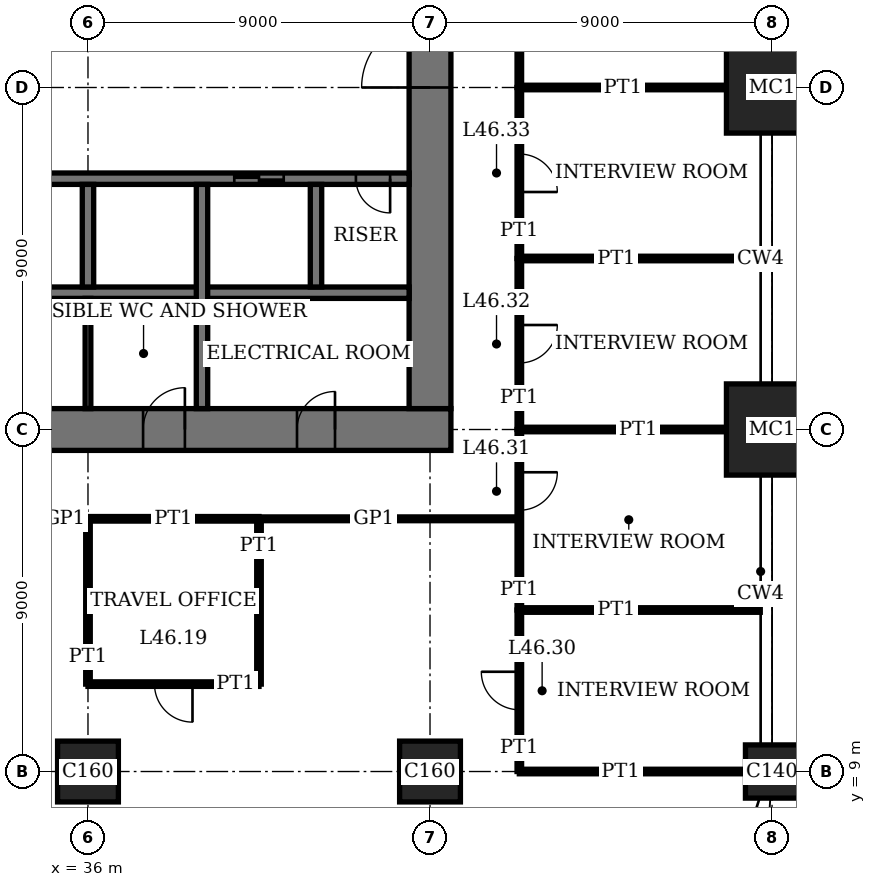
"""IFC4 building model, lengths in metres.
Left out: names, types, materials, properties, quantities, classifications, styles, units other than length and angle.
Written with IfcOpenShell. Run it as: python <this file> out.ifc"""

import sys

from ifc_helpers import new_model, si_unit, direction, frame, frame_2d, origin, origin_2d, place, context, subcontext, project, spatial, rectangle, extrude, element, fill, save


model = new_model("IFC4")
c1 = context("Model", 3, precision=1e-05, world=origin(), true_north=direction((0.0, 1.0)))
c2 = subcontext(c1, "Body", "Model", "MODEL_VIEW")
j1 = project(units=[si_unit("LENGTHUNIT", "METRE"), si_unit("PLANEANGLEUNIT", "RADIAN")], contexts=[c1])
p1 = place(None, origin())
s1 = spatial("IfcSite", under=j1, at=p1, CompositionType="ELEMENT")
p2 = place(p1, origin())
s2 = spatial("IfcBuilding", under=s1, at=p2, CompositionType="ELEMENT")
p3 = place(p2, frame((0.0, 0.0, 190.2)))
s3 = spatial("IfcBuildingStorey", under=s2, at=p3, CompositionType="ELEMENT", Elevation=190.2)
for number, where, z_axis, x_axis in (
    (1, (36.0, 9.0, 0.0), (0.0, 0.0, 1.0), (1.0, 0.0, 0.0)),
    (2, (45.0, 9.0, 0.0), (0.0, 0.0, 1.0), (1.0, 0.0, 0.0)),
):
    element("IfcColumn", number, at=place(p3, frame(where, z_axis=z_axis, x_axis=x_axis)), inside=s3, PredefinedType="COLUMN", context=c2, shape_type="SweptSolid", body=[
        extrude(rectangle(XDim=1.6, YDim=1.6, at=origin_2d()), origin(), (0.0, 0.0, 1.0), 4.0),
    ])
p4 = place(p3, frame((54.0, 9.0, 0.0), z_axis=(0.0, 0.0, 1.0), x_axis=(1.0, 0.0, 0.0)))
e3 = element("IfcColumn", 3, at=p4, inside=s3, PredefinedType="COLUMN", context=c2, shape_type="SweptSolid", body=[
    extrude(rectangle(XDim=1.4, YDim=1.4, at=origin_2d()), origin(), (0.0, 0.0, 1.0), 4.0),
])
for number, where, z_axis, x_axis in (
    (4, (54.0, 18.0, 0.0), (0.0, 0.0, 1.0), (1.0, 0.0, 0.0)),
    (5, (54.0, 27.0, 0.0), (0.0, 0.0, 1.0), (1.0, 0.0, 0.0)),
):
    element("IfcColumn", number, at=place(p3, frame(where, z_axis=z_axis, x_axis=x_axis)), inside=s3, PredefinedType="COLUMN", context=c2, shape_type="SweptSolid", body=[
        extrude(rectangle(XDim=2.4, YDim=2.4, at=origin_2d()), origin(), (0.0, 0.0, 1.0), 4.0),
    ])
p5 = place(p3, frame((17.45, 18.0, 0.0), z_axis=(0.0, 0.0, 1.0), x_axis=(1.0, 0.0, 0.0)))
e6 = element("IfcWall", 6, at=p5, inside=s3, PredefinedType="SHEAR", context=c2, shape_type="SweptSolid", body=[
    extrude(rectangle(XDim=28.1, YDim=1.1, at=frame_2d((14.05, 0.0))), origin(), (0.0, 0.0, 1.0), 4.0),
])
p6 = place(p5, frame((11.55, 0.0, 0.0)))
e7 = element("IfcOpeningElement", 7, at=p6, cuts=e6, PredefinedType="OPENING", context=c2, shape_type="SweptSolid", body=[
    extrude(rectangle(XDim=1.0, YDim=2.4, at=frame_2d((0.5, 1.2))), frame((0.0, 0.56, 0.0), z_axis=(0.0, -1.0, 0.0), x_axis=(1.0, 0.0, 0.0)), (0.0, 0.0, 1.0), 1.12),
])
p7 = place(p5, frame((16.55, 0.0, 0.0)))
e8 = element("IfcOpeningElement", 8, at=p7, cuts=e6, PredefinedType="OPENING", context=c2, shape_type="SweptSolid", body=[
    extrude(rectangle(XDim=1.0, YDim=2.4, at=frame_2d((0.5, 1.2))), frame((0.0, 0.56, 0.0), z_axis=(0.0, -1.0, 0.0), x_axis=(1.0, 0.0, 0.0)), (0.0, 0.0, 1.0), 1.12),
])
p8 = place(p5, frame((20.0, 0.0, 0.0)))
e9 = element("IfcOpeningElement", 9, at=p8, cuts=e6, PredefinedType="OPENING", context=c2, shape_type="SweptSolid", body=[
    extrude(rectangle(XDim=1.1, YDim=2.4, at=frame_2d((0.55, 1.2))), frame((0.0, 0.56, 0.0), z_axis=(0.0, -1.0, 0.0), x_axis=(1.0, 0.0, 0.0)), (0.0, 0.0, 1.0), 1.12),
])
p9 = place(p5, frame((24.05, 0.0, 0.0)))
e10 = element("IfcOpeningElement", 10, at=p9, cuts=e6, PredefinedType="OPENING", context=c2, shape_type="SweptSolid", body=[
    extrude(rectangle(XDim=1.0, YDim=2.4, at=frame_2d((0.5, 1.2))), frame((0.0, 0.56, 0.0), z_axis=(0.0, -1.0, 0.0), x_axis=(1.0, 0.0, 0.0)), (0.0, 0.0, 1.0), 1.12),
])
p10 = place(p3, frame((45.0, 18.55, 0.0), z_axis=(0.0, 0.0, 1.0), x_axis=(0.0, 1.0, 0.0)))
e11 = element("IfcWall", 11, at=p10, inside=s3, PredefinedType="SHEAR", context=c2, shape_type="SweptSolid", body=[
    extrude(rectangle(XDim=16.9, YDim=1.1, at=frame_2d((8.45, 0.0))), origin(), (0.0, 0.0, 1.0), 4.0),
])
p11 = place(p10, frame((8.45, 0.0, 0.0)))
e12 = element("IfcOpeningElement", 12, at=p11, cuts=e11, PredefinedType="OPENING", context=c2, shape_type="SweptSolid", body=[
    extrude(rectangle(XDim=1.8, YDim=2.4, at=frame_2d((0.9, 1.2))), frame((0.0, 0.56, 0.0), z_axis=(0.0, -1.0, 0.0), x_axis=(1.0, 0.0, 0.0)), (0.0, 0.0, 1.0), 1.12),
])
p12 = place(p3, frame((18.55, 24.6, 0.0), z_axis=(0.0, 0.0, 1.0), x_axis=(1.0, 0.0, 0.0)))
e13 = element("IfcWall", 13, at=p12, inside=s3, PredefinedType="SHEAR", context=c2, shape_type="SweptSolid", body=[
    extrude(rectangle(XDim=25.9, YDim=0.3, at=frame_2d((12.95, 0.0))), origin(), (0.0, 0.0, 1.0), 4.0),
])
p13 = place(p12, frame((4.95, 0.0, 0.0)))
e14 = element("IfcOpeningElement", 14, at=p13, cuts=e13, PredefinedType="OPENING", context=c2, shape_type="SweptSolid", body=[
    extrude(rectangle(XDim=1.0, YDim=2.4, at=frame_2d((0.5, 1.2))), frame((0.0, 0.16, 0.0), z_axis=(0.0, -1.0, 0.0), x_axis=(1.0, 0.0, 0.0)), (0.0, 0.0, 1.0), 0.32),
])
p14 = place(p12, frame((24.5, 0.0, 0.0)))
e15 = element("IfcOpeningElement", 15, at=p14, cuts=e13, PredefinedType="OPENING", context=c2, shape_type="SweptSolid", body=[
    extrude(rectangle(XDim=0.9, YDim=2.1, at=frame_2d((0.45, 1.05))), frame((0.0, 0.16, 0.0), z_axis=(0.0, -1.0, 0.0), x_axis=(1.0, 0.0, 0.0)), (0.0, 0.0, 1.0), 0.32),
])
p15 = place(p12, frame((21.3, 0.0, 0.0)))
e16 = element("IfcOpeningElement", 16, at=p15, cuts=e13, PredefinedType="OPENING", context=c2, shape_type="SweptSolid", body=[
    extrude(rectangle(XDim=1.3, YDim=2.4, at=frame_2d((0.65, 1.2))), frame((0.0, 0.16, 0.0), z_axis=(0.0, -1.0, 0.0), x_axis=(1.0, 0.0, 0.0)), (0.0, 0.0, 1.0), 0.32),
])
p16 = place(p3, frame((27.15, 21.6, 0.0), z_axis=(0.0, 0.0, 1.0), x_axis=(1.0, 0.0, 0.0)))
e17 = element("IfcWall", 17, at=p16, inside=s3, PredefinedType="SHEAR", context=c2, shape_type="SweptSolid", body=[
    extrude(rectangle(XDim=17.3, YDim=0.3, at=frame_2d((8.65, 0.0))), origin(), (0.0, 0.0, 1.0), 4.0),
])
p17 = place(p3, frame((36.0, 21.75, 0.0), z_axis=(0.0, 0.0, 1.0), x_axis=(0.0, 1.0, 0.0)))
e18 = element("IfcWall", 18, at=p17, inside=s3, PredefinedType="SHEAR", context=c2, shape_type="SweptSolid", body=[
    extrude(rectangle(XDim=2.7, YDim=0.3, at=frame_2d((1.35, 0.0))), origin(), (0.0, 0.0, 1.0), 4.0),
])
p18 = place(p3, frame((39.0, 18.55, 0.0), z_axis=(0.0, 0.0, 1.0), x_axis=(0.0, 1.0, 0.0)))
e19 = element("IfcWall", 19, at=p18, inside=s3, PredefinedType="SHEAR", context=c2, shape_type="SweptSolid", body=[
    extrude(rectangle(XDim=5.9, YDim=0.3, at=frame_2d((2.95, 0.0))), origin(), (0.0, 0.0, 1.0), 4.0),
])
p19 = place(p3, frame((42.0, 21.75, 0.0), z_axis=(0.0, 0.0, 1.0), x_axis=(0.0, 1.0, 0.0)))
e20 = element("IfcWall", 20, at=p19, inside=s3, PredefinedType="SHEAR", context=c2, shape_type="SweptSolid", body=[
    extrude(rectangle(XDim=2.7, YDim=0.3, at=frame_2d((1.35, 0.0))), origin(), (0.0, 0.0, 1.0), 4.0),
])
p20 = place(p3, frame((47.35, 9.0, 0.0), z_axis=(0.0, 0.0, 1.0), x_axis=(1.0, 0.0, 0.0)))
e21 = element("IfcWall", 21, at=p20, inside=s3, PredefinedType="PARTITIONING", context=c2, shape_type="SweptSolid", body=[
    extrude(rectangle(XDim=5.95, YDim=0.12, at=frame_2d((2.975, 0.0))), origin(), (0.0, 0.0, 1.0), 3.05),
])
p21 = place(p3, frame((36.0, 11.3, 0.0), z_axis=(0.0, 0.0, 1.0), x_axis=(1.0, 0.0, 0.0)))
e22 = element("IfcWall", 22, at=p21, inside=s3, PredefinedType="PARTITIONING", context=c2, shape_type="SweptSolid", body=[
    extrude(rectangle(XDim=4.5, YDim=0.12, at=frame_2d((2.25, 0.0))), origin(), (0.0, 0.0, 1.0), 3.75),
])
p22 = place(p21, frame((1.75, 0.0, 0.0)))
e23 = element("IfcOpeningElement", 23, at=p22, cuts=e22, PredefinedType="OPENING", context=c2, shape_type="SweptSolid", body=[
    extrude(rectangle(XDim=1.0, YDim=2.4, at=frame_2d((0.5, 1.2))), frame((0.0, 0.07, 0.0), z_axis=(0.0, -1.0, 0.0), x_axis=(1.0, 0.0, 0.0)), (0.0, 0.0, 1.0), 0.14),
])
p23 = place(p3, frame((47.35, 13.25, 0.0), z_axis=(0.0, 0.0, 1.0), x_axis=(1.0, 0.0, 0.0)))
e24 = element("IfcWall", 24, at=p23, inside=s3, PredefinedType="PARTITIONING", context=c2, shape_type="SweptSolid", body=[
    extrude(rectangle(XDim=6.34, YDim=0.12, at=frame_2d((3.17, 0.0))), origin(), (0.0, 0.0, 1.0), 3.1),
])
p24 = place(p3, frame((36.0, 15.65, 0.0), z_axis=(0.0, 0.0, 1.0), x_axis=(1.0, 0.0, 0.0)))
e25 = element("IfcWall", 25, at=p24, inside=s3, PredefinedType="PARTITIONING", context=c2, shape_type="SweptSolid", body=[
    extrude(rectangle(XDim=4.5, YDim=0.12, at=frame_2d((2.25, 0.0))), origin(), (0.0, 0.0, 1.0), 3.75),
])
p25 = place(p3, frame((31.5, 15.65, 0.0), z_axis=(0.0, 0.0, 1.0), x_axis=(1.0, 0.0, 0.0)))
e26 = element("IfcWall", 26, at=p25, inside=s3, PredefinedType="PARTITIONING", context=c2, shape_type="SweptSolid", body=[
    extrude(rectangle(XDim=4.5, YDim=0.1, at=frame_2d((2.25, 0.0))), origin(), (0.0, 0.0, 1.0), 3.75),
])
p26 = place(p25, frame((1.75, 0.0, 0.0)))
e27 = element("IfcOpeningElement", 27, at=p26, cuts=e26, PredefinedType="OPENING", context=c2, shape_type="SweptSolid", body=[
    extrude(rectangle(XDim=1.0, YDim=2.4, at=frame_2d((0.5, 1.2))), frame((0.0, 0.06, 0.0), z_axis=(0.0, -1.0, 0.0), x_axis=(1.0, 0.0, 0.0)), (0.0, 0.0, 1.0), 0.12),
])
p27 = place(p3, frame((40.5, 15.65, 0.0), z_axis=(0.0, 0.0, 1.0), x_axis=(1.0, 0.0, 0.0)))
e28 = element("IfcWall", 28, at=p27, inside=s3, PredefinedType="PARTITIONING", context=c2, shape_type="SweptSolid", body=[
    extrude(rectangle(XDim=6.85, YDim=0.1, at=frame_2d((3.425, 0.0))), origin(), (0.0, 0.0, 1.0), 3.75),
])
p28 = place(p3, frame((47.35, 18.0, 0.0), z_axis=(0.0, 0.0, 1.0), x_axis=(1.0, 0.0, 0.0)))
e29 = element("IfcWall", 29, at=p28, inside=s3, PredefinedType="PARTITIONING", context=c2, shape_type="SweptSolid", body=[
    extrude(rectangle(XDim=5.45, YDim=0.12, at=frame_2d((2.725, 0.0))), origin(), (0.0, 0.0, 1.0), 3.05),
])
p29 = place(p3, frame((47.35, 22.5, 0.0), z_axis=(0.0, 0.0, 1.0), x_axis=(1.0, 0.0, 0.0)))
e30 = element("IfcWall", 30, at=p29, inside=s3, PredefinedType="PARTITIONING", context=c2, shape_type="SweptSolid", body=[
    extrude(rectangle(XDim=6.34, YDim=0.12, at=frame_2d((3.17, 0.0))), origin(), (0.0, 0.0, 1.0), 3.1),
])
p30 = place(p3, frame((47.35, 27.0, 0.0), z_axis=(0.0, 0.0, 1.0), x_axis=(1.0, 0.0, 0.0)))
e31 = element("IfcWall", 31, at=p30, inside=s3, PredefinedType="PARTITIONING", context=c2, shape_type="SweptSolid", body=[
    extrude(rectangle(XDim=5.45, YDim=0.12, at=frame_2d((2.725, 0.0))), origin(), (0.0, 0.0, 1.0), 3.05),
])
p31 = place(p3, frame((36.0, 11.3, 0.0), z_axis=(0.0, 0.0, 1.0), x_axis=(0.0, 1.0, 0.0)))
e32 = element("IfcWall", 32, at=p31, inside=s3, PredefinedType="PARTITIONING", context=c2, shape_type="SweptSolid", body=[
    extrude(rectangle(XDim=4.35, YDim=0.12, at=frame_2d((2.175, 0.0))), origin(), (0.0, 0.0, 1.0), 3.05),
])
p32 = place(p3, frame((40.5, 11.3, 0.0), z_axis=(0.0, 0.0, 1.0), x_axis=(0.0, 1.0, 0.0)))
e33 = element("IfcWall", 33, at=p32, inside=s3, PredefinedType="PARTITIONING", context=c2, shape_type="SweptSolid", body=[
    extrude(rectangle(XDim=4.35, YDim=0.12, at=frame_2d((2.175, 0.0))), origin(), (0.0, 0.0, 1.0), 3.75),
])
p33 = place(p3, frame((47.35, 9.0, 0.0), z_axis=(0.0, 0.0, 1.0), x_axis=(0.0, 1.0, 0.0)))
e34 = element("IfcWall", 34, at=p33, inside=s3, PredefinedType="PARTITIONING", context=c2, shape_type="SweptSolid", body=[
    extrude(rectangle(XDim=4.25, YDim=0.12, at=frame_2d((2.125, 0.0))), origin(), (0.0, 0.0, 1.0), 3.75),
])
p34 = place(p33, frame((1.625, 0.0, 0.0)))
e35 = element("IfcOpeningElement", 35, at=p34, cuts=e34, PredefinedType="OPENING", context=c2, shape_type="SweptSolid", body=[
    extrude(rectangle(XDim=1.0, YDim=2.4, at=frame_2d((0.5, 1.2))), frame((0.0, 0.07, 0.0), z_axis=(0.0, -1.0, 0.0), x_axis=(1.0, 0.0, 0.0)), (0.0, 0.0, 1.0), 0.14),
])
p35 = place(p3, frame((47.35, 13.25, 0.0), z_axis=(0.0, 0.0, 1.0), x_axis=(0.0, 1.0, 0.0)))
e36 = element("IfcWall", 36, at=p35, inside=s3, PredefinedType="PARTITIONING", context=c2, shape_type="SweptSolid", body=[
    extrude(rectangle(XDim=4.75, YDim=0.12, at=frame_2d((2.375, 0.0))), origin(), (0.0, 0.0, 1.0), 3.75),
])
p36 = place(p35, frame((2.625, 0.0, 0.0)))
e37 = element("IfcOpeningElement", 37, at=p36, cuts=e36, PredefinedType="OPENING", context=c2, shape_type="SweptSolid", body=[
    extrude(rectangle(XDim=1.0, YDim=2.4, at=frame_2d((0.5, 1.2))), frame((0.0, 0.07, 0.0), z_axis=(0.0, -1.0, 0.0), x_axis=(1.0, 0.0, 0.0)), (0.0, 0.0, 1.0), 0.14),
])
p37 = place(p3, frame((47.35, 18.0, 0.0), z_axis=(0.0, 0.0, 1.0), x_axis=(0.0, 1.0, 0.0)))
e38 = element("IfcWall", 38, at=p37, inside=s3, PredefinedType="PARTITIONING", context=c2, shape_type="SweptSolid", body=[
    extrude(rectangle(XDim=4.5, YDim=0.12, at=frame_2d((2.25, 0.0))), origin(), (0.0, 0.0, 1.0), 3.75),
])
p38 = place(p37, frame((1.75, 0.0, 0.0)))
e39 = element("IfcOpeningElement", 39, at=p38, cuts=e38, PredefinedType="OPENING", context=c2, shape_type="SweptSolid", body=[
    extrude(rectangle(XDim=1.0, YDim=2.4, at=frame_2d((0.5, 1.2))), frame((0.0, 0.07, 0.0), z_axis=(0.0, -1.0, 0.0), x_axis=(1.0, 0.0, 0.0)), (0.0, 0.0, 1.0), 0.14),
])
p39 = place(p3, frame((47.35, 22.5, 0.0), z_axis=(0.0, 0.0, 1.0), x_axis=(0.0, 1.0, 0.0)))
e40 = element("IfcWall", 40, at=p39, inside=s3, PredefinedType="PARTITIONING", context=c2, shape_type="SweptSolid", body=[
    extrude(rectangle(XDim=4.5, YDim=0.12, at=frame_2d((2.25, 0.0))), origin(), (0.0, 0.0, 1.0), 3.75),
])
p40 = place(p39, frame((1.75, 0.0, 0.0)))
e41 = element("IfcOpeningElement", 41, at=p40, cuts=e40, PredefinedType="OPENING", context=c2, shape_type="SweptSolid", body=[
    extrude(rectangle(XDim=1.0, YDim=2.4, at=frame_2d((0.5, 1.2))), frame((0.0, 0.07, 0.0), z_axis=(0.0, -1.0, 0.0), x_axis=(1.0, 0.0, 0.0)), (0.0, 0.0, 1.0), 0.14),
])
p41 = place(p3, frame((47.35, 27.0, 0.0), z_axis=(0.0, 0.0, 1.0), x_axis=(0.0, 1.0, 0.0)))
e42 = element("IfcWall", 42, at=p41, inside=s3, PredefinedType="PARTITIONING", context=c2, shape_type="SweptSolid", body=[
    extrude(rectangle(XDim=9.0, YDim=0.12, at=frame_2d((4.5, 0.0))), origin(), (0.0, 0.0, 1.0), 3.75),
])
p42 = place(p41, frame((4.0, 0.0, 0.0)))
e43 = element("IfcOpeningElement", 43, at=p42, cuts=e42, PredefinedType="OPENING", context=c2, shape_type="SweptSolid", body=[
    extrude(rectangle(XDim=1.0, YDim=2.4, at=frame_2d((0.5, 1.2))), frame((0.0, 0.07, 0.0), z_axis=(0.0, -1.0, 0.0), x_axis=(1.0, 0.0, 0.0)), (0.0, 0.0, 1.0), 0.14),
])
p43 = place(p3, frame((36.0, 18.55, 0.0), z_axis=(0.0, 0.0, 1.0), x_axis=(0.0, 1.0, 0.0)))
e44 = element("IfcWall", 44, at=p43, inside=s3, PredefinedType="PARTITIONING", context=c2, shape_type="SweptSolid", body=[
    extrude(rectangle(XDim=2.9, YDim=0.15, at=frame_2d((1.45, 0.0))), origin(), (0.0, 0.0, 1.0), 3.75),
])
p44 = place(p11, origin())
e45 = element("IfcDoor", 45, at=p44, inside=s3, OperationType="DOUBLE_DOOR_DOUBLE_SWING", PredefinedType="DOOR", context=c2, shape_type="SweptSolid", body=[
    extrude(rectangle(XDim=1.8, YDim=2.4, at=frame_2d((0.9, 1.2))), frame((0.0, 0.03, 0.0), z_axis=(0.0, -1.0, 0.0), x_axis=(1.0, 0.0, 0.0)), (0.0, 0.0, 1.0), 0.06),
    extrude(rectangle(XDim=0.04, YDim=2.4, at=frame_2d((0.02, 1.2))), frame((0.0, 0.55, 0.0), z_axis=(0.0, -1.0, 0.0), x_axis=(1.0, 0.0, 0.0)), (0.0, 0.0, 1.0), 1.1),
    extrude(rectangle(XDim=0.04, YDim=2.4, at=frame_2d((1.78, 1.2))), frame((0.0, 0.55, 0.0), z_axis=(0.0, -1.0, 0.0), x_axis=(1.0, 0.0, 0.0)), (0.0, 0.0, 1.0), 1.1),
    extrude(rectangle(XDim=1.8, YDim=0.04, at=frame_2d((0.9, 2.38))), frame((0.0, 0.55, 0.0), z_axis=(0.0, -1.0, 0.0), x_axis=(1.0, 0.0, 0.0)), (0.0, 0.0, 1.0), 1.1),
])
fill(e12, e45)
p45 = place(p8, origin())
e46 = element("IfcDoor", 46, at=p45, inside=s3, OperationType="SINGLE_SWING_LEFT", PredefinedType="DOOR", context=c2, shape_type="SweptSolid", body=[
    extrude(rectangle(XDim=1.1, YDim=2.4, at=frame_2d((0.55, 1.2))), frame((0.0, 0.025, 0.0), z_axis=(0.0, -1.0, 0.0), x_axis=(1.0, 0.0, 0.0)), (0.0, 0.0, 1.0), 0.05),
    extrude(rectangle(XDim=0.04, YDim=2.4, at=frame_2d((0.02, 1.2))), frame((0.0, 0.44, 0.0), z_axis=(0.0, -1.0, 0.0), x_axis=(1.0, 0.0, 0.0)), (0.0, 0.0, 1.0), 0.88),
    extrude(rectangle(XDim=0.04, YDim=2.4, at=frame_2d((1.08, 1.2))), frame((0.0, 0.44, 0.0), z_axis=(0.0, -1.0, 0.0), x_axis=(1.0, 0.0, 0.0)), (0.0, 0.0, 1.0), 0.88),
    extrude(rectangle(XDim=1.1, YDim=0.04, at=frame_2d((0.55, 2.38))), frame((0.0, 0.44, 0.0), z_axis=(0.0, -1.0, 0.0), x_axis=(1.0, 0.0, 0.0)), (0.0, 0.0, 1.0), 0.88),
])
fill(e9, e46)
p46 = place(p9, origin())
e47 = element("IfcDoor", 47, at=p46, inside=s3, OperationType="SINGLE_SWING_LEFT", PredefinedType="DOOR", context=c2, shape_type="SweptSolid", body=[
    extrude(rectangle(XDim=1.0, YDim=2.4, at=frame_2d((0.5, 1.2))), frame((0.0, 0.025, 0.0), z_axis=(0.0, -1.0, 0.0), x_axis=(1.0, 0.0, 0.0)), (0.0, 0.0, 1.0), 0.05),
    extrude(rectangle(XDim=0.04, YDim=2.4, at=frame_2d((0.02, 1.2))), frame((0.0, 0.4, 0.0), z_axis=(0.0, -1.0, 0.0), x_axis=(1.0, 0.0, 0.0)), (0.0, 0.0, 1.0), 0.8),
    extrude(rectangle(XDim=0.04, YDim=2.4, at=frame_2d((0.98, 1.2))), frame((0.0, 0.4, 0.0), z_axis=(0.0, -1.0, 0.0), x_axis=(1.0, 0.0, 0.0)), (0.0, 0.0, 1.0), 0.8),
    extrude(rectangle(XDim=1.0, YDim=0.04, at=frame_2d((0.5, 2.38))), frame((0.0, 0.4, 0.0), z_axis=(0.0, -1.0, 0.0), x_axis=(1.0, 0.0, 0.0)), (0.0, 0.0, 1.0), 0.8),
])
fill(e10, e47)
p47 = place(p14, origin())
e48 = element("IfcDoor", 48, at=p47, inside=s3, OperationType="SINGLE_SWING_RIGHT", PredefinedType="DOOR", context=c2, shape_type="SweptSolid", body=[
    extrude(rectangle(XDim=0.9, YDim=2.1, at=frame_2d((0.45, 1.05))), frame((0.0, 0.03, 0.0), z_axis=(0.0, -1.0, 0.0), x_axis=(1.0, 0.0, 0.0)), (0.0, 0.0, 1.0), 0.06),
])
fill(e15, e48)
p48 = place(p22, origin())
e49 = element("IfcDoor", 49, at=p48, inside=s3, OperationType="SINGLE_SWING_RIGHT", PredefinedType="DOOR", context=c2, shape_type="SweptSolid", body=[
    extrude(rectangle(XDim=1.0, YDim=2.4, at=frame_2d((0.5, 1.2))), frame((0.0, 0.025, 0.0), z_axis=(0.0, -1.0, 0.0), x_axis=(1.0, 0.0, 0.0)), (0.0, 0.0, 1.0), 0.05),
])
fill(e23, e49)
p49 = place(p34, origin())
e50 = element("IfcDoor", 50, at=p49, inside=s3, OperationType="SINGLE_SWING_LEFT", PredefinedType="DOOR", context=c2, shape_type="SweptSolid", body=[
    extrude(rectangle(XDim=1.0, YDim=2.4, at=frame_2d((0.5, 1.2))), frame((0.0, 0.025, 0.0), z_axis=(0.0, -1.0, 0.0), x_axis=(1.0, 0.0, 0.0)), (0.0, 0.0, 1.0), 0.05),
])
fill(e35, e50)
p50 = place(p36, origin())
e51 = element("IfcDoor", 51, at=p50, inside=s3, OperationType="SINGLE_SWING_RIGHT", PredefinedType="DOOR", context=c2, shape_type="SweptSolid", body=[
    extrude(rectangle(XDim=1.0, YDim=2.4, at=frame_2d((0.5, 1.2))), frame((0.0, 0.025, 0.0), z_axis=(0.0, -1.0, 0.0), x_axis=(1.0, 0.0, 0.0)), (0.0, 0.0, 1.0), 0.05),
])
fill(e37, e51)
p51 = place(p38, origin())
e52 = element("IfcDoor", 52, at=p51, inside=s3, OperationType="SINGLE_SWING_RIGHT", PredefinedType="DOOR", context=c2, shape_type="SweptSolid", body=[
    extrude(rectangle(XDim=1.0, YDim=2.4, at=frame_2d((0.5, 1.2))), frame((0.0, 0.025, 0.0), z_axis=(0.0, -1.0, 0.0), x_axis=(1.0, 0.0, 0.0)), (0.0, 0.0, 1.0), 0.05),
])
fill(e39, e52)
p52 = place(p40, origin())
e53 = element("IfcDoor", 53, at=p52, inside=s3, OperationType="SINGLE_SWING_LEFT", PredefinedType="DOOR", context=c2, shape_type="SweptSolid", body=[
    extrude(rectangle(XDim=1.0, YDim=2.4, at=frame_2d((0.5, 1.2))), frame((0.0, 0.025, 0.0), z_axis=(0.0, -1.0, 0.0), x_axis=(1.0, 0.0, 0.0)), (0.0, 0.0, 1.0), 0.05),
])
fill(e41, e53)
p53 = place(p15, origin())
e54 = element("IfcDoor", 54, at=p53, inside=s3, OperationType="DOUBLE_DOOR_SLIDING", PredefinedType="DOOR", context=c2, shape_type="SweptSolid", body=[
    extrude(rectangle(XDim=1.3, YDim=2.4, at=frame_2d((0.65, 1.2))), frame((0.0, 0.02, 0.0), z_axis=(0.0, -1.0, 0.0), x_axis=(1.0, 0.0, 0.0)), (0.0, 0.0, 1.0), 0.04),
])
fill(e16, e54)
save(model, sys.argv[1])
